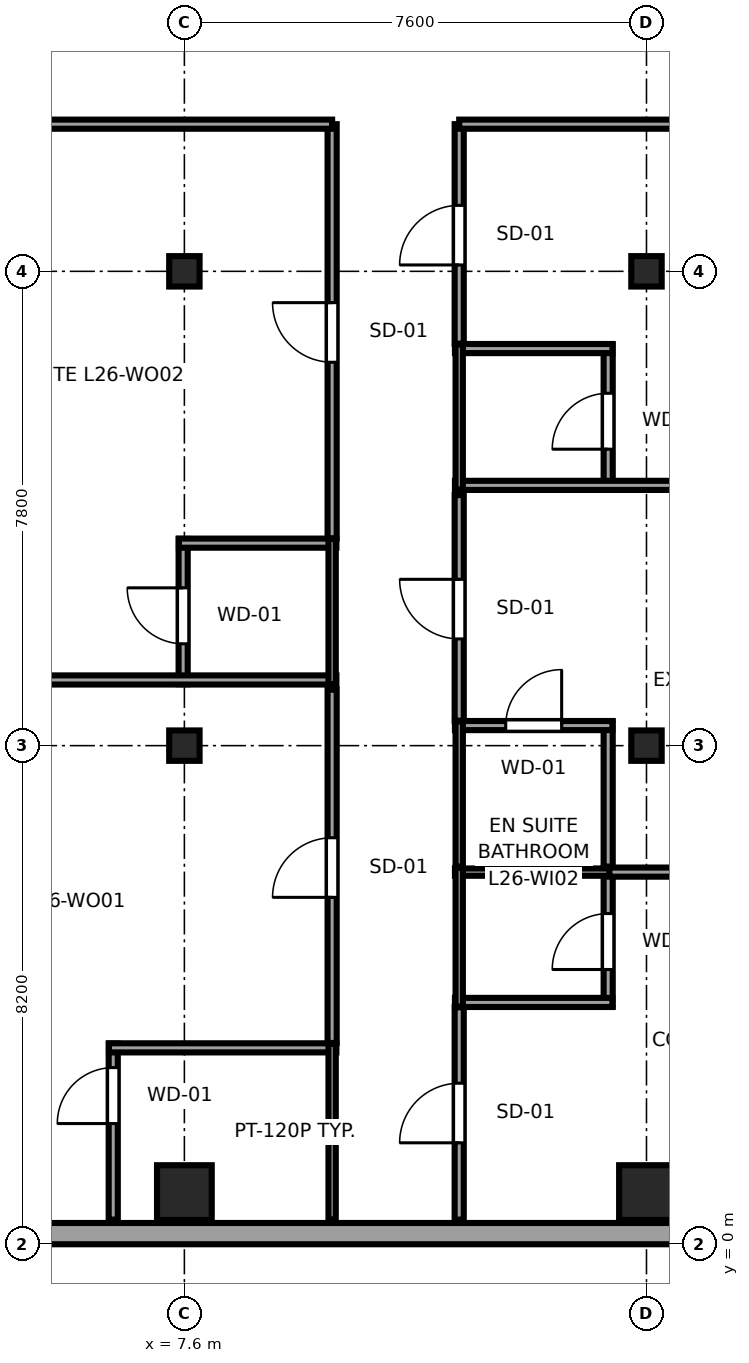
"""IFC4 building model, lengths in metres.
Left out: names, types, materials, properties, quantities, classifications, styles, units other than length and angle.
Written with IfcOpenShell. Run it as: python <this file> out.ifc"""

import sys

from ifc_helpers import new_model, si_unit, direction, frame, frame_2d, origin, origin_2d, place, context, subcontext, project, spatial, rectangle, i_section, extrude, source, transform, mapped, element, fill, save


model = new_model("IFC4")
c1 = context("Model", 3, precision=1e-05, world=origin(), true_north=direction((0.0, 1.0)))
c2 = subcontext(c1, "Body", "Model", "MODEL_VIEW")
j1 = project(units=[si_unit("LENGTHUNIT", "METRE"), si_unit("PLANEANGLEUNIT", "RADIAN")], contexts=[c1])
p1 = place(None, origin())
s1 = spatial("IfcSite", under=j1, at=p1, CompositionType="ELEMENT")
p2 = place(p1, origin())
s2 = spatial("IfcBuilding", under=s1, at=p2, CompositionType="ELEMENT")
p3 = place(p2, frame((0.0, 0.0, 104.45)))
s3 = spatial("IfcBuildingStorey", under=s2, at=p3, CompositionType="ELEMENT", Elevation=104.45)
m1 = source(origin(), c2, "Body", "SweptSolid", [
    extrude(rectangle(XDim=0.9, YDim=0.9, at=origin_2d()), origin(), (0.0, 0.0, 1.0), 3.55),
])
p4 = place(p3, frame((7.6, 0.85, 0.0), z_axis=(0.0, 0.0, 1.0), x_axis=(1.0, 0.0, 0.0)))
e1 = element("IfcColumn", 1, at=p4, inside=s3, PredefinedType="COLUMN", context=c2, shape_type="MappedRepresentation", body=[
    mapped(m1, transform((0.0, 0.0, 0.0), x_axis=(1.0, 0.0, 0.0), y_axis=(0.0, 1.0, 0.0), z_axis=(0.0, 0.0, 1.0), scale=1.0)),
])
m2 = source(origin(), c2, "Body", "SweptSolid", [
    extrude(i_section(OverallWidth=0.5, OverallDepth=0.5, WebThickness=0.022, FlangeThickness=0.034, at=origin_2d()), origin(), (0.0, 0.0, 1.0), 3.55),
])
for number, where, z_axis, x_axis in (
    (2, (7.6, 8.2, 0.0), (0.0, 0.0, 1.0), (1.0, 0.0, 0.0)),
    (3, (7.6, 16.0, 0.0), (0.0, 0.0, 1.0), (1.0, 0.0, 0.0)),
):
    element("IfcColumn", number, at=place(p3, frame(where, z_axis=z_axis, x_axis=x_axis)), inside=s3, PredefinedType="COLUMN", context=c2, shape_type="MappedRepresentation", body=[
        mapped(m2, transform((0.0, 0.0, 0.0), x_axis=(1.0, 0.0, 0.0), y_axis=(0.0, 1.0, 0.0), z_axis=(0.0, 0.0, 1.0), scale=1.0)),
    ])
p5 = place(p3, frame((15.2, 0.85, 0.0), z_axis=(0.0, 0.0, 1.0), x_axis=(1.0, 0.0, 0.0)))
e4 = element("IfcColumn", 4, at=p5, inside=s3, PredefinedType="COLUMN", context=c2, shape_type="MappedRepresentation", body=[
    mapped(m1, transform((0.0, 0.0, 0.0), x_axis=(1.0, 0.0, 0.0), y_axis=(0.0, 1.0, 0.0), z_axis=(0.0, 0.0, 1.0), scale=1.0)),
])
for number, where, z_axis, x_axis in (
    (5, (15.2, 8.2, 0.0), (0.0, 0.0, 1.0), (1.0, 0.0, 0.0)),
    (6, (15.2, 16.0, 0.0), (0.0, 0.0, 1.0), (1.0, 0.0, 0.0)),
):
    element("IfcColumn", number, at=place(p3, frame(where, z_axis=z_axis, x_axis=x_axis)), inside=s3, PredefinedType="COLUMN", context=c2, shape_type="MappedRepresentation", body=[
        mapped(m2, transform((0.0, 0.0, 0.0), x_axis=(1.0, 0.0, 0.0), y_axis=(0.0, 1.0, 0.0), z_axis=(0.0, 0.0, 1.0), scale=1.0)),
    ])
p6 = place(p3, frame((4.617, 0.175, 0.0), z_axis=(0.0, 0.0, 1.0), x_axis=(1.0, 0.0, 0.0)))
e7 = element("IfcWall", 7, at=p6, inside=s3, PredefinedType="SOLIDWALL", context=c2, shape_type="SweptSolid", body=[
    extrude(rectangle(XDim=18.008, YDim=0.35, at=frame_2d((9.004, 0.0))), origin(), (0.0, 0.0, 1.0), 3.37),
])
p7 = place(p6, frame((11.255, 0.0, 0.68)))
e8 = element("IfcOpeningElement", 8, at=p7, cuts=e7, PredefinedType="OPENING", context=c2, shape_type="SweptSolid", body=[
    extrude(rectangle(XDim=1.8, YDim=1.85, at=frame_2d((0.9, 0.925))), frame((0.0, 0.185, 0.0), z_axis=(0.0, -1.0, 0.0), x_axis=(1.0, 0.0, 0.0)), (0.0, 0.0, 1.0), 0.37),
])
p8 = place(p6, frame((14.407, 0.0, 0.68)))
e9 = element("IfcOpeningElement", 9, at=p8, cuts=e7, PredefinedType="OPENING", context=c2, shape_type="SweptSolid", body=[
    extrude(rectangle(XDim=1.8, YDim=1.85, at=frame_2d((0.9, 0.925))), frame((0.0, 0.185, 0.0), z_axis=(0.0, -1.0, 0.0), x_axis=(1.0, 0.0, 0.0)), (0.0, 0.0, 1.0), 0.37),
])
p9 = place(p3, frame((6.43, 0.405, 0.0), z_axis=(0.0, 0.0, 1.0), x_axis=(0.0, 1.0, 0.0)))
e10 = element("IfcWall", 10, at=p9, inside=s3, PredefinedType="PARTITIONING", context=c2, shape_type="SweptSolid", body=[
    extrude(rectangle(XDim=2.895, YDim=0.15, at=frame_2d((1.448, 0.0))), origin(), (0.0, 0.0, 1.0), 3.37),
])
p10 = place(p9, frame((1.58, 0.0, 0.0)))
e11 = element("IfcOpeningElement", 11, at=p10, cuts=e10, PredefinedType="OPENING", context=c2, shape_type="SweptSolid", body=[
    extrude(rectangle(XDim=0.92, YDim=2.01, at=frame_2d((0.46, 1.005))), frame((0.0, 0.085, 0.0), z_axis=(0.0, -1.0, 0.0), x_axis=(1.0, 0.0, 0.0)), (0.0, 0.0, 1.0), 0.17),
])
p11 = place(p3, frame((6.36, 3.23, 0.0), z_axis=(0.0, 0.0, 1.0), x_axis=(1.0, 0.0, 0.0)))
e12 = element("IfcWall", 12, at=p11, inside=s3, PredefinedType="PARTITIONING", context=c2, shape_type="SweptSolid", body=[
    extrude(rectangle(XDim=3.74, YDim=0.15, at=frame_2d((1.87, 0.0))), origin(), (0.0, 0.0, 1.0), 3.37),
])
p12 = place(p3, frame((10.03, 0.405, 0.0), z_axis=(0.0, 0.0, 1.0), x_axis=(0.0, 1.0, 0.0)))
e13 = element("IfcWall", 13, at=p12, inside=s3, PredefinedType="PLUMBINGWALL", context=c2, shape_type="SweptSolid", body=[
    extrude(rectangle(XDim=2.895, YDim=0.12, at=frame_2d((1.448, 0.0))), origin(), (0.0, 0.0, 1.0), 3.37),
])
p13 = place(p3, frame((7.58, 9.21, 0.0), z_axis=(0.0, 0.0, 1.0), x_axis=(0.0, 1.0, 0.0)))
e14 = element("IfcWall", 14, at=p13, inside=s3, PredefinedType="PARTITIONING", context=c2, shape_type="SweptSolid", body=[
    extrude(rectangle(XDim=2.39, YDim=0.15, at=frame_2d((1.195, 0.0))), origin(), (0.0, 0.0, 1.0), 2.827),
])
p14 = place(p13, frame((0.665, 0.0, 0.0)))
e15 = element("IfcOpeningElement", 15, at=p14, cuts=e14, PredefinedType="OPENING", context=c2, shape_type="SweptSolid", body=[
    extrude(rectangle(XDim=0.92, YDim=2.01, at=frame_2d((0.46, 1.005))), frame((0.0, 0.085, 0.0), z_axis=(0.0, -1.0, 0.0), x_axis=(1.0, 0.0, 0.0)), (0.0, 0.0, 1.0), 0.17),
])
p15 = place(p3, frame((0.3, 9.28, 0.0), z_axis=(0.0, 0.0, 1.0), x_axis=(1.0, 0.0, 0.0)))
e16 = element("IfcWall", 16, at=p15, inside=s3, PredefinedType="PARTITIONING", context=c2, shape_type="SweptSolid", body=[
    extrude(rectangle(XDim=9.8, YDim=0.15, at=frame_2d((4.9, 0.0))), origin(), (0.0, 0.0, 1.0), 3.37),
])
p16 = place(p3, frame((7.51, 11.53, 0.0), z_axis=(0.0, 0.0, 1.0), x_axis=(1.0, 0.0, 0.0)))
e17 = element("IfcWall", 17, at=p16, inside=s3, PredefinedType="PARTITIONING", context=c2, shape_type="SweptSolid", body=[
    extrude(rectangle(XDim=2.59, YDim=0.15, at=frame_2d((1.295, 0.0))), origin(), (0.0, 0.0, 1.0), 3.37),
])
p17 = place(p3, frame((10.03, 9.21, 0.0), z_axis=(0.0, 0.0, 1.0), x_axis=(0.0, 1.0, 0.0)))
e18 = element("IfcWall", 18, at=p17, inside=s3, PredefinedType="PLUMBINGWALL", context=c2, shape_type="SweptSolid", body=[
    extrude(rectangle(XDim=2.39, YDim=0.12, at=frame_2d((1.195, 0.0))), origin(), (0.0, 0.0, 1.0), 3.37),
])
p18 = place(p3, frame((14.57, 3.907, 0.0), z_axis=(0.0, 0.0, 1.0), x_axis=(0.0, 1.0, 0.0)))
e19 = element("IfcWall", 19, at=p18, inside=s3, PredefinedType="PARTITIONING", context=c2, shape_type="SweptSolid", body=[
    extrude(rectangle(XDim=2.283, YDim=0.15, at=frame_2d((1.142, 0.0))), origin(), (0.0, 0.0, 1.0), 3.37),
])
p19 = place(p18, frame((0.612, 0.0, 0.0)))
e20 = element("IfcOpeningElement", 20, at=p19, cuts=e19, PredefinedType="OPENING", context=c2, shape_type="SweptSolid", body=[
    extrude(rectangle(XDim=0.92, YDim=2.01, at=frame_2d((0.46, 1.005))), frame((0.0, 0.085, 0.0), z_axis=(0.0, -1.0, 0.0), x_axis=(1.0, 0.0, 0.0)), (0.0, 0.0, 1.0), 0.17),
])
p20 = place(p3, frame((12.05, 3.977, 0.0), z_axis=(0.0, 0.0, 1.0), x_axis=(1.0, 0.0, 0.0)))
e21 = element("IfcWall", 21, at=p20, inside=s3, PredefinedType="PARTITIONING", context=c2, shape_type="SweptSolid", body=[
    extrude(rectangle(XDim=2.59, YDim=0.15, at=frame_2d((1.295, 0.0))), origin(), (0.0, 0.0, 1.0), 3.37),
])
p21 = place(p3, frame((12.05, 6.12, 0.0), z_axis=(0.0, 0.0, 1.0), x_axis=(1.0, 0.0, 0.0)))
e22 = element("IfcWall", 22, at=p21, inside=s3, PredefinedType="PLUMBINGWALL", context=c2, shape_type="SweptSolid", body=[
    extrude(rectangle(XDim=2.59, YDim=0.12, at=frame_2d((1.295, 0.0))), origin(), (0.0, 0.0, 1.0), 3.37),
])
p22 = place(p3, frame((12.12, 3.907, 0.0), z_axis=(0.0, 0.0, 1.0), x_axis=(0.0, 1.0, 0.0)))
e23 = element("IfcWall", 23, at=p22, inside=s3, PredefinedType="PLUMBINGWALL", context=c2, shape_type="SweptSolid", body=[
    extrude(rectangle(XDim=2.283, YDim=0.12, at=frame_2d((1.142, 0.0))), origin(), (0.0, 0.0, 1.0), 3.37),
])
p23 = place(p3, frame((14.57, 6.21, 0.0), z_axis=(0.0, 0.0, 1.0), x_axis=(0.0, 1.0, 0.0)))
e24 = element("IfcWall", 24, at=p23, inside=s3, PredefinedType="PARTITIONING", context=c2, shape_type="SweptSolid", body=[
    extrude(rectangle(XDim=2.39, YDim=0.15, at=frame_2d((1.195, 0.0))), origin(), (0.0, 0.0, 1.0), 3.37),
])
p24 = place(p3, frame((12.05, 8.53, 0.0), z_axis=(0.0, 0.0, 1.0), x_axis=(1.0, 0.0, 0.0)))
e25 = element("IfcWall", 25, at=p24, inside=s3, PredefinedType="PARTITIONING", context=c2, shape_type="SweptSolid", body=[
    extrude(rectangle(XDim=2.59, YDim=0.15, at=frame_2d((1.295, 0.0))), origin(), (0.0, 0.0, 1.0), 3.37),
])
p25 = place(p24, frame((0.835, 0.0, 0.0)))
e26 = element("IfcOpeningElement", 26, at=p25, cuts=e25, PredefinedType="OPENING", context=c2, shape_type="SweptSolid", body=[
    extrude(rectangle(XDim=0.92, YDim=2.01, at=frame_2d((0.46, 1.005))), frame((0.0, 0.085, 0.0), z_axis=(0.0, -1.0, 0.0), x_axis=(1.0, 0.0, 0.0)), (0.0, 0.0, 1.0), 0.17),
])
p26 = place(p3, frame((12.12, 6.21, 0.0), z_axis=(0.0, 0.0, 1.0), x_axis=(0.0, 1.0, 0.0)))
e27 = element("IfcWall", 27, at=p26, inside=s3, PredefinedType="PLUMBINGWALL", context=c2, shape_type="SweptSolid", body=[
    extrude(rectangle(XDim=2.39, YDim=0.12, at=frame_2d((1.195, 0.0))), origin(), (0.0, 0.0, 1.0), 3.37),
])
p27 = place(p3, frame((14.57, 12.41, 0.0), z_axis=(0.0, 0.0, 1.0), x_axis=(0.0, 1.0, 0.0)))
e28 = element("IfcWall", 28, at=p27, inside=s3, PredefinedType="PARTITIONING", context=c2, shape_type="SweptSolid", body=[
    extrude(rectangle(XDim=2.39, YDim=0.15, at=frame_2d((1.195, 0.0))), origin(), (0.0, 0.0, 1.0), 3.37),
])
p28 = place(p27, frame((0.665, 0.0, 0.0)))
e29 = element("IfcOpeningElement", 29, at=p28, cuts=e28, PredefinedType="OPENING", context=c2, shape_type="SweptSolid", body=[
    extrude(rectangle(XDim=0.92, YDim=2.01, at=frame_2d((0.46, 1.005))), frame((0.0, 0.085, 0.0), z_axis=(0.0, -1.0, 0.0), x_axis=(1.0, 0.0, 0.0)), (0.0, 0.0, 1.0), 0.17),
])
p29 = place(p3, frame((12.05, 12.48, 0.0), z_axis=(0.0, 0.0, 1.0), x_axis=(1.0, 0.0, 0.0)))
e30 = element("IfcWall", 30, at=p29, inside=s3, PredefinedType="PARTITIONING", context=c2, shape_type="SweptSolid", body=[
    extrude(rectangle(XDim=10.3, YDim=0.15, at=frame_2d((5.15, 0.0))), origin(), (0.0, 0.0, 1.0), 3.37),
])
p30 = place(p3, frame((12.05, 14.73, 0.0), z_axis=(0.0, 0.0, 1.0), x_axis=(1.0, 0.0, 0.0)))
e31 = element("IfcWall", 31, at=p30, inside=s3, PredefinedType="PARTITIONING", context=c2, shape_type="SweptSolid", body=[
    extrude(rectangle(XDim=2.59, YDim=0.15, at=frame_2d((1.295, 0.0))), origin(), (0.0, 0.0, 1.0), 3.37),
])
p31 = place(p3, frame((12.12, 12.41, 0.0), z_axis=(0.0, 0.0, 1.0), x_axis=(0.0, 1.0, 0.0)))
e32 = element("IfcWall", 32, at=p31, inside=s3, PredefinedType="PLUMBINGWALL", context=c2, shape_type="SweptSolid", body=[
    extrude(rectangle(XDim=2.39, YDim=0.12, at=frame_2d((1.195, 0.0))), origin(), (0.0, 0.0, 1.0), 3.37),
])
p32 = place(p3, frame((10.03, 3.31, 0.0), z_axis=(0.0, 0.0, 1.0), x_axis=(0.0, 1.0, 0.0)))
e33 = element("IfcWall", 33, at=p32, inside=s3, PredefinedType="PARTITIONING", context=c2, shape_type="SweptSolid", body=[
    extrude(rectangle(XDim=5.81, YDim=0.15, at=frame_2d((2.905, 0.0))), origin(), (0.0, 0.0, 1.0), 3.37),
])
p33 = place(p32, frame((2.395, 0.0, 0.0)))
e34 = element("IfcOpeningElement", 34, at=p33, cuts=e33, PredefinedType="OPENING", context=c2, shape_type="SweptSolid", body=[
    extrude(rectangle(XDim=0.98, YDim=2.12, at=frame_2d((0.49, 1.06))), frame((0.0, 0.085, 0.0), z_axis=(0.0, -1.0, 0.0), x_axis=(1.0, 0.0, 0.0)), (0.0, 0.0, 1.0), 0.17),
])
p34 = place(p3, frame((10.03, 11.61, 0.0), z_axis=(0.0, 0.0, 1.0), x_axis=(0.0, 1.0, 0.0)))
e35 = element("IfcWall", 35, at=p34, inside=s3, PredefinedType="PARTITIONING", context=c2, shape_type="SweptSolid", body=[
    extrude(rectangle(XDim=6.81, YDim=0.15, at=frame_2d((3.405, 0.0))), origin(), (0.0, 0.0, 1.0), 3.37),
])
p35 = place(p34, frame((2.895, 0.0, 0.0)))
e36 = element("IfcOpeningElement", 36, at=p35, cuts=e35, PredefinedType="OPENING", context=c2, shape_type="SweptSolid", body=[
    extrude(rectangle(XDim=0.98, YDim=2.12, at=frame_2d((0.49, 1.06))), frame((0.0, 0.085, 0.0), z_axis=(0.0, -1.0, 0.0), x_axis=(1.0, 0.0, 0.0)), (0.0, 0.0, 1.0), 0.17),
])
p36 = place(p3, frame((0.3, 18.42, 0.0), z_axis=(0.0, 0.0, 1.0), x_axis=(1.0, 0.0, 0.0)))
e37 = element("IfcWall", 37, at=p36, inside=s3, PredefinedType="PARTITIONING", context=c2, shape_type="SweptSolid", body=[
    extrude(rectangle(XDim=9.73, YDim=0.15, at=frame_2d((4.865, 0.0))), origin(), (0.0, 0.0, 1.0), 3.37),
])
p37 = place(p3, frame((12.12, 0.405, 0.0), z_axis=(0.0, 0.0, 1.0), x_axis=(0.0, 1.0, 0.0)))
e38 = element("IfcWall", 38, at=p37, inside=s3, PredefinedType="PARTITIONING", context=c2, shape_type="SweptSolid", body=[
    extrude(rectangle(XDim=3.492, YDim=0.15, at=frame_2d((1.746, 0.0))), origin(), (0.0, 0.0, 1.0), 3.37),
])
p38 = place(p37, frame((1.263, 0.0, 0.0)))
e39 = element("IfcOpeningElement", 39, at=p38, cuts=e38, PredefinedType="OPENING", context=c2, shape_type="SweptSolid", body=[
    extrude(rectangle(XDim=0.98, YDim=2.12, at=frame_2d((0.49, 1.06))), frame((0.0, 0.085, 0.0), z_axis=(0.0, -1.0, 0.0), x_axis=(1.0, 0.0, 0.0)), (0.0, 0.0, 1.0), 0.17),
])
p39 = place(p3, frame((14.59, 6.12, 0.0), z_axis=(0.0, 0.0, 1.0), x_axis=(1.0, 0.0, 0.0)))
e40 = element("IfcWall", 40, at=p39, inside=s3, PredefinedType="PARTITIONING", context=c2, shape_type="SweptSolid", body=[
    extrude(rectangle(XDim=7.76, YDim=0.15, at=frame_2d((3.88, 0.0))), origin(), (0.0, 0.0, 1.0), 3.37),
])
p40 = place(p3, frame((12.12, 8.61, 0.0), z_axis=(0.0, 0.0, 1.0), x_axis=(0.0, 1.0, 0.0)))
e41 = element("IfcWall", 41, at=p40, inside=s3, PredefinedType="PARTITIONING", context=c2, shape_type="SweptSolid", body=[
    extrude(rectangle(XDim=3.71, YDim=0.15, at=frame_2d((1.855, 0.0))), origin(), (0.0, 0.0, 1.0), 3.37),
])
p41 = place(p40, frame((1.345, 0.0, 0.0)))
e42 = element("IfcOpeningElement", 42, at=p41, cuts=e41, PredefinedType="OPENING", context=c2, shape_type="SweptSolid", body=[
    extrude(rectangle(XDim=0.98, YDim=2.12, at=frame_2d((0.49, 1.06))), frame((0.0, 0.085, 0.0), z_axis=(0.0, -1.0, 0.0), x_axis=(1.0, 0.0, 0.0)), (0.0, 0.0, 1.0), 0.17),
])
p42 = place(p3, frame((12.12, 14.81, 0.0), z_axis=(0.0, 0.0, 1.0), x_axis=(0.0, 1.0, 0.0)))
e43 = element("IfcWall", 43, at=p42, inside=s3, PredefinedType="PARTITIONING", context=c2, shape_type="SweptSolid", body=[
    extrude(rectangle(XDim=3.61, YDim=0.15, at=frame_2d((1.805, 0.0))), origin(), (0.0, 0.0, 1.0), 3.37),
])
p43 = place(p42, frame((1.295, 0.0, 0.0)))
e44 = element("IfcOpeningElement", 44, at=p43, cuts=e43, PredefinedType="OPENING", context=c2, shape_type="SweptSolid", body=[
    extrude(rectangle(XDim=0.98, YDim=2.12, at=frame_2d((0.49, 1.06))), frame((0.0, 0.085, 0.0), z_axis=(0.0, -1.0, 0.0), x_axis=(1.0, 0.0, 0.0)), (0.0, 0.0, 1.0), 0.17),
])
p44 = place(p3, frame((12.12, 18.42, 0.0), z_axis=(0.0, 0.0, 1.0), x_axis=(1.0, 0.0, 0.0)))
e45 = element("IfcWall", 45, at=p44, inside=s3, PredefinedType="PARTITIONING", context=c2, shape_type="SweptSolid", body=[
    extrude(rectangle(XDim=10.23, YDim=0.15, at=frame_2d((5.115, 0.0))), origin(), (0.0, 0.0, 1.0), 3.37),
])
m3 = source(origin(), c2, "Body", "SweptSolid", [
    extrude(rectangle(XDim=0.92, YDim=2.01, at=frame_2d((0.46, 1.005))), frame((0.0, 0.025, 0.0), z_axis=(0.0, -1.0, 0.0), x_axis=(1.0, 0.0, 0.0)), (0.0, 0.0, 1.0), 0.05),
])
p45 = place(p10, origin())
e46 = element("IfcDoor", 46, at=p45, inside=s3, OperationType="SINGLE_SWING_LEFT", PredefinedType="DOOR", context=c2, shape_type="MappedRepresentation", body=[
    mapped(m3, transform((0.0, 0.0, 0.0), x_axis=(1.0, 0.0, 0.0), y_axis=(0.0, 1.0, 0.0), z_axis=(0.0, 0.0, 1.0), scale=1.0)),
])
fill(e11, e46)
p46 = place(p14, origin())
e47 = element("IfcDoor", 47, at=p46, inside=s3, OperationType="SINGLE_SWING_RIGHT", PredefinedType="DOOR", context=c2, shape_type="MappedRepresentation", body=[
    mapped(m3, transform((0.0, 0.0, 0.0), x_axis=(1.0, 0.0, 0.0), y_axis=(0.0, 1.0, 0.0), z_axis=(0.0, 0.0, 1.0), scale=1.0)),
])
fill(e15, e47)
p47 = place(p19, origin())
e48 = element("IfcDoor", 48, at=p47, inside=s3, OperationType="SINGLE_SWING_LEFT", PredefinedType="DOOR", context=c2, shape_type="MappedRepresentation", body=[
    mapped(m3, transform((0.0, 0.0, 0.0), x_axis=(1.0, 0.0, 0.0), y_axis=(0.0, 1.0, 0.0), z_axis=(0.0, 0.0, 1.0), scale=1.0)),
])
fill(e20, e48)
p48 = place(p25, origin())
e49 = element("IfcDoor", 49, at=p48, inside=s3, OperationType="SINGLE_SWING_RIGHT", PredefinedType="DOOR", context=c2, shape_type="MappedRepresentation", body=[
    mapped(m3, transform((0.0, 0.0, 0.0), x_axis=(1.0, 0.0, 0.0), y_axis=(0.0, 1.0, 0.0), z_axis=(0.0, 0.0, 1.0), scale=1.0)),
])
fill(e26, e49)
p49 = place(p28, origin())
e50 = element("IfcDoor", 50, at=p49, inside=s3, OperationType="SINGLE_SWING_LEFT", PredefinedType="DOOR", context=c2, shape_type="MappedRepresentation", body=[
    mapped(m3, transform((0.0, 0.0, 0.0), x_axis=(1.0, 0.0, 0.0), y_axis=(0.0, 1.0, 0.0), z_axis=(0.0, 0.0, 1.0), scale=1.0)),
])
fill(e29, e50)
m4 = source(origin(), c2, "Body", "SweptSolid", [
    extrude(rectangle(XDim=0.98, YDim=2.12, at=frame_2d((0.49, 1.06))), frame((0.0, 0.025, 0.0), z_axis=(0.0, -1.0, 0.0), x_axis=(1.0, 0.0, 0.0)), (0.0, 0.0, 1.0), 0.05),
])
p50 = place(p33, origin())
e51 = element("IfcDoor", 51, at=p50, inside=s3, OperationType="SINGLE_SWING_LEFT", PredefinedType="DOOR", context=c2, shape_type="MappedRepresentation", body=[
    mapped(m4, transform((0.0, 0.0, 0.0), x_axis=(1.0, 0.0, 0.0), y_axis=(0.0, 1.0, 0.0), z_axis=(0.0, 0.0, 1.0), scale=1.0)),
])
fill(e34, e51)
p51 = place(p35, origin())
e52 = element("IfcDoor", 52, at=p51, inside=s3, OperationType="SINGLE_SWING_RIGHT", PredefinedType="DOOR", context=c2, shape_type="MappedRepresentation", body=[
    mapped(m4, transform((0.0, 0.0, 0.0), x_axis=(1.0, 0.0, 0.0), y_axis=(0.0, 1.0, 0.0), z_axis=(0.0, 0.0, 1.0), scale=1.0)),
])
fill(e36, e52)
p52 = place(p38, origin())
e53 = element("IfcDoor", 53, at=p52, inside=s3, OperationType="SINGLE_SWING_LEFT", PredefinedType="DOOR", context=c2, shape_type="MappedRepresentation", body=[
    mapped(m4, transform((0.0, 0.0, 0.0), x_axis=(1.0, 0.0, 0.0), y_axis=(0.0, 1.0, 0.0), z_axis=(0.0, 0.0, 1.0), scale=1.0)),
])
fill(e39, e53)
p53 = place(p41, origin())
e54 = element("IfcDoor", 54, at=p53, inside=s3, OperationType="SINGLE_SWING_RIGHT", PredefinedType="DOOR", context=c2, shape_type="MappedRepresentation", body=[
    mapped(m4, transform((0.0, 0.0, 0.0), x_axis=(1.0, 0.0, 0.0), y_axis=(0.0, 1.0, 0.0), z_axis=(0.0, 0.0, 1.0), scale=1.0)),
])
fill(e42, e54)
p54 = place(p43, origin())
e55 = element("IfcDoor", 55, at=p54, inside=s3, OperationType="SINGLE_SWING_LEFT", PredefinedType="DOOR", context=c2, shape_type="MappedRepresentation", body=[
    mapped(m4, transform((0.0, 0.0, 0.0), x_axis=(1.0, 0.0, 0.0), y_axis=(0.0, 1.0, 0.0), z_axis=(0.0, 0.0, 1.0), scale=1.0)),
])
fill(e44, e55)
save(model, sys.argv[1])
